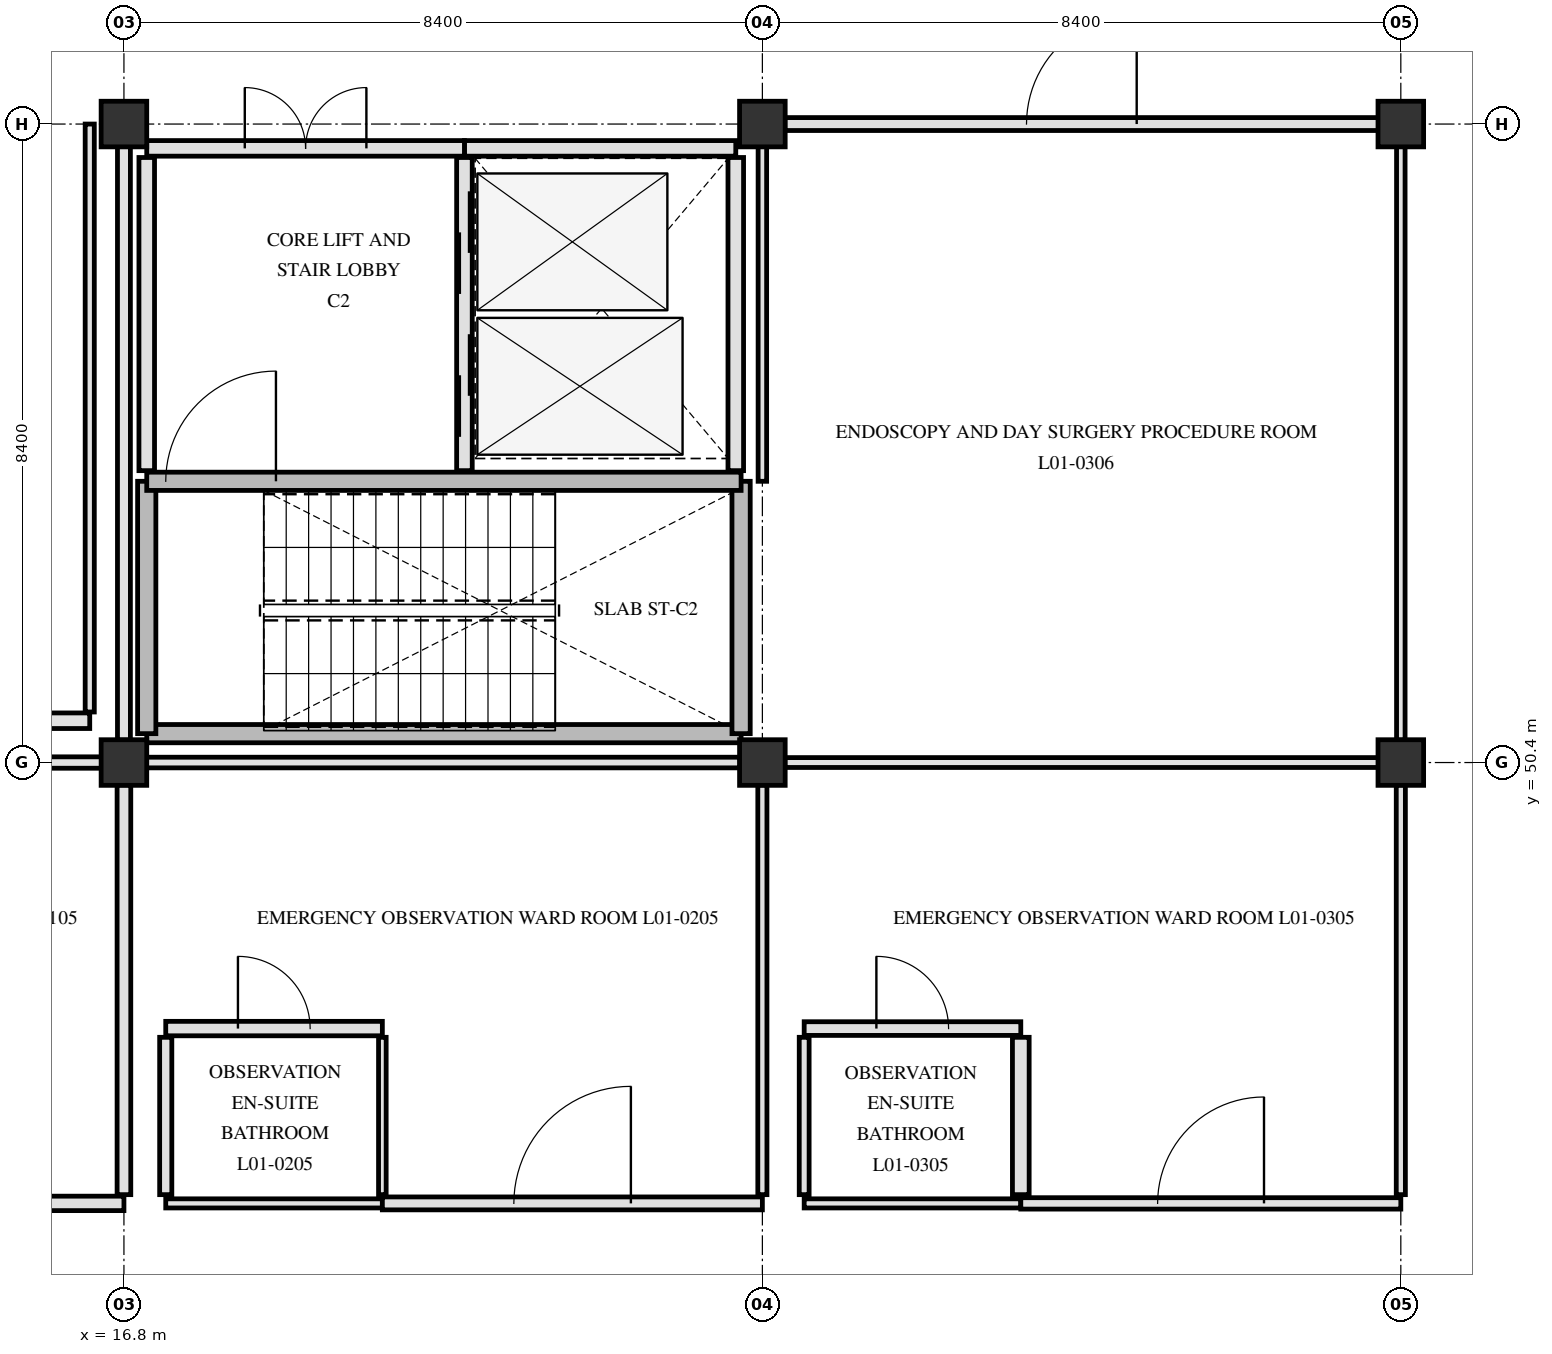
"""IFC4 building model, lengths in metres.
Left out: names, types, materials, properties, quantities, classifications, styles, units other than length and angle.
Written with IfcOpenShell. Run it as: python <this file> out.ifc"""

import sys

from ifc_helpers import new_model, si_unit, direction, frame, frame_2d, origin, origin_2d, place, context, subcontext, project, spatial, rectangle, extrude, element, fill, save


model = new_model("IFC4")
c1 = context("Model", 3, precision=1e-05, world=origin(), true_north=direction((0.0, 1.0)))
c2 = subcontext(c1, "Body", "Model", "MODEL_VIEW")
j1 = project(units=[si_unit("LENGTHUNIT", "METRE"), si_unit("PLANEANGLEUNIT", "RADIAN")], contexts=[c1])
p1 = place(None, origin())
s1 = spatial("IfcSite", under=j1, at=p1, CompositionType="ELEMENT")
p2 = place(p1, origin())
s2 = spatial("IfcBuilding", under=s1, at=p2, CompositionType="ELEMENT")
p3 = place(p2, frame((0.0, 0.0, 4.8)))
s3 = spatial("IfcBuildingStorey", under=s2, at=p3, CompositionType="ELEMENT", Elevation=4.8)
for number, where, z_axis, x_axis in (
    (1, (16.8, 50.4, 0.0), (0.0, 0.0, 1.0), (1.0, 0.0, 0.0)),
    (2, (16.8, 58.8, 0.0), (0.0, 0.0, 1.0), (1.0, 0.0, 0.0)),
    (3, (25.2, 50.4, 0.0), (0.0, 0.0, 1.0), (1.0, 0.0, 0.0)),
    (4, (25.2, 58.8, 0.0), (0.0, 0.0, 1.0), (1.0, 0.0, 0.0)),
    (5, (33.6, 50.4, 0.0), (0.0, 0.0, 1.0), (1.0, 0.0, 0.0)),
    (6, (33.6, 58.8, 0.0), (0.0, 0.0, 1.0), (1.0, 0.0, 0.0)),
):
    element("IfcColumn", number, at=place(p3, frame(where, z_axis=z_axis, x_axis=x_axis)), inside=s3, PredefinedType="COLUMN", context=c2, shape_type="SweptSolid", body=[
        extrude(rectangle(XDim=0.6, YDim=0.6, at=origin_2d()), origin(), (0.0, 0.0, 1.0), 4.5),
    ])
p4 = place(p3, frame((17.1, 50.78, 0.0), z_axis=(0.0, 0.0, 1.0), x_axis=(1.0, 0.0, 0.0)))
e7 = element("IfcWall", 7, at=p4, inside=s3, PredefinedType="SHEAR", context=c2, shape_type="SweptSolid", body=[
    extrude(rectangle(XDim=7.82, YDim=0.24, at=frame_2d((3.91, 0.0))), origin(), (0.0, 0.0, 1.0), 4.15),
])
for number, where, z_axis, x_axis in (
    (8, (17.1, 50.78, 0.0), (0.0, 0.0, 1.0), (0.0, 1.0, 0.0)),
    (9, (24.92, 50.78, 0.0), (0.0, 0.0, 1.0), (0.0, 1.0, 0.0)),
):
    element("IfcWall", number, at=place(p3, frame(where, z_axis=z_axis, x_axis=x_axis)), inside=s3, PredefinedType="SHEAR", context=c2, shape_type="SweptSolid", body=[
        extrude(rectangle(XDim=3.32, YDim=0.24, at=frame_2d((1.66, 0.0))), origin(), (0.0, 0.0, 1.0), 4.15),
    ])
p5 = place(p3, frame((17.1, 54.1, 0.0), z_axis=(0.0, 0.0, 1.0), x_axis=(1.0, 0.0, 0.0)))
e10 = element("IfcWall", 10, at=p5, inside=s3, PredefinedType="SHEAR", context=c2, shape_type="SweptSolid", body=[
    extrude(rectangle(XDim=7.82, YDim=0.24, at=frame_2d((3.91, 0.0))), origin(), (0.0, 0.0, 1.0), 4.15),
])
p6 = place(p5, frame((0.25, 0.0, 0.0)))
e11 = element("IfcOpeningElement", 11, at=p6, cuts=e10, PredefinedType="OPENING", context=c2, shape_type="SweptSolid", body=[
    extrude(rectangle(XDim=1.45, YDim=2.2, at=frame_2d((0.725, 1.1))), frame((0.0, 0.13, 0.0), z_axis=(0.0, -1.0, 0.0), x_axis=(1.0, 0.0, 0.0)), (0.0, 0.0, 1.0), 0.26),
])
p7 = place(p3, frame((21.28, 54.24, 0.0), z_axis=(0.0, 0.0, 1.0), x_axis=(0.0, 1.0, 0.0)))
e12 = element("IfcWall", 12, at=p7, inside=s3, PredefinedType="PARTITIONING", context=c2, shape_type="SweptSolid", body=[
    extrude(rectangle(XDim=4.12, YDim=0.205, at=frame_2d((2.06, 0.0))), origin(), (0.0, 0.0, 1.0), 4.14),
])
p8 = place(p7, frame((0.445, 0.0, 0.0)))
e13 = element("IfcOpeningElement", 13, at=p8, cuts=e12, PredefinedType="OPENING", context=c2, shape_type="SweptSolid", body=[
    extrude(rectangle(XDim=1.35, YDim=2.2, at=frame_2d((0.675, 1.1))), frame((0.0, 0.113, 0.0), z_axis=(0.0, -1.0, 0.0), x_axis=(1.0, 0.0, 0.0)), (0.0, 0.0, 1.0), 0.225),
])
p9 = place(p7, frame((2.325, 0.0, 0.0)))
e14 = element("IfcOpeningElement", 14, at=p9, cuts=e12, PredefinedType="OPENING", context=c2, shape_type="SweptSolid", body=[
    extrude(rectangle(XDim=1.35, YDim=2.2, at=frame_2d((0.675, 1.1))), frame((0.0, 0.113, 0.0), z_axis=(0.0, -1.0, 0.0), x_axis=(1.0, 0.0, 0.0)), (0.0, 0.0, 1.0), 0.225),
])
p10 = place(p3, frame((24.85, 54.24, 0.0), z_axis=(0.0, 0.0, 1.0), x_axis=(0.0, 1.0, 0.0)))
e15 = element("IfcWall", 15, at=p10, inside=s3, PredefinedType="PARTITIONING", context=c2, shape_type="SweptSolid", body=[
    extrude(rectangle(XDim=4.12, YDim=0.205, at=frame_2d((2.06, 0.0))), origin(), (0.0, 0.0, 1.0), 4.14),
])
p11 = place(p3, frame((21.28, 58.48, 0.0), z_axis=(0.0, 0.0, 1.0), x_axis=(1.0, 0.0, 0.0)))
e16 = element("IfcWall", 16, at=p11, inside=s3, PredefinedType="PARTITIONING", context=c2, shape_type="SweptSolid", body=[
    extrude(rectangle(XDim=3.57, YDim=0.205, at=frame_2d((1.785, 0.0))), origin(), (0.0, 0.0, 1.0), 3.54),
])
p12 = place(p3, frame((17.1, 54.24, 0.0), z_axis=(0.0, 0.0, 1.0), x_axis=(0.0, 1.0, 0.0)))
e17 = element("IfcWall", 17, at=p12, inside=s3, PredefinedType="PARTITIONING", context=c2, shape_type="SweptSolid", body=[
    extrude(rectangle(XDim=4.12, YDim=0.205, at=frame_2d((2.06, 0.0))), origin(), (0.0, 0.0, 1.0), 3.59),
])
p13 = place(p3, frame((17.1, 58.48, 0.0), z_axis=(0.0, 0.0, 1.0), x_axis=(1.0, 0.0, 0.0)))
e18 = element("IfcWall", 18, at=p13, inside=s3, PredefinedType="PARTITIONING", context=c2, shape_type="SweptSolid", body=[
    extrude(rectangle(XDim=4.18, YDim=0.205, at=frame_2d((2.09, 0.0))), origin(), (0.0, 0.0, 1.0), 3.54),
])
p14 = place(p13, frame((1.29, 0.0, 0.0)))
e19 = element("IfcOpeningElement", 19, at=p14, cuts=e18, PredefinedType="OPENING", context=c2, shape_type="SweptSolid", body=[
    extrude(rectangle(XDim=1.6, YDim=2.25, at=frame_2d((0.8, 1.125))), frame((0.0, 0.113, 0.0), z_axis=(0.0, -1.0, 0.0), x_axis=(1.0, 0.0, 0.0)), (0.0, 0.0, 1.0), 0.225),
])
p15 = place(p3, frame((11.8, 44.6, 0.0), z_axis=(0.0, 0.0, 1.0), x_axis=(1.0, 0.0, 0.0)))
e20 = element("IfcWall", 20, at=p15, inside=s3, PredefinedType="PARTITIONING", context=c2, shape_type="SweptSolid", body=[
    extrude(rectangle(XDim=5.0, YDim=0.19, at=frame_2d((2.5, 0.0))), origin(), (0.0, 0.0, 1.0), 3.59),
])
p16 = place(p15, frame((1.91, 0.0, 0.0)))
e21 = element("IfcOpeningElement", 21, at=p16, cuts=e20, PredefinedType="OPENING", context=c2, shape_type="SweptSolid", body=[
    extrude(rectangle(XDim=1.18, YDim=2.18, at=frame_2d((0.59, 1.09))), frame((0.0, 0.105, 0.0), z_axis=(0.0, -1.0, 0.0), x_axis=(1.0, 0.0, 0.0)), (0.0, 0.0, 1.0), 0.21),
])
p17 = place(p3, frame((17.35, 44.6, 0.0), z_axis=(0.0, 0.0, 1.0), x_axis=(1.0, 0.0, 0.0)))
e22 = element("IfcWall", 22, at=p17, inside=s3, PredefinedType="PARTITIONING", context=c2, shape_type="SweptSolid", body=[
    extrude(rectangle(XDim=2.85, YDim=0.12, at=frame_2d((1.425, 0.0))), origin(), (0.0, 0.0, 1.0), 4.14),
])
p18 = place(p3, frame((20.2, 44.6, 0.0), z_axis=(0.0, 0.0, 1.0), x_axis=(1.0, 0.0, 0.0)))
e23 = element("IfcWall", 23, at=p18, inside=s3, PredefinedType="PARTITIONING", context=c2, shape_type="SweptSolid", body=[
    extrude(rectangle(XDim=5.0, YDim=0.17, at=frame_2d((2.5, 0.0))), origin(), (0.0, 0.0, 1.0), 3.59),
])
p19 = place(p18, frame((1.73, 0.0, 0.0)))
e24 = element("IfcOpeningElement", 24, at=p19, cuts=e23, PredefinedType="OPENING", context=c2, shape_type="SweptSolid", body=[
    extrude(rectangle(XDim=1.54, YDim=2.24, at=frame_2d((0.77, 1.12))), frame((0.0, 0.095, 0.0), z_axis=(0.0, -1.0, 0.0), x_axis=(1.0, 0.0, 0.0)), (0.0, 0.0, 1.0), 0.19),
])
p20 = place(p3, frame((25.75, 44.6, 0.0), z_axis=(0.0, 0.0, 1.0), x_axis=(1.0, 0.0, 0.0)))
e25 = element("IfcWall", 25, at=p20, inside=s3, PredefinedType="PARTITIONING", context=c2, shape_type="SweptSolid", body=[
    extrude(rectangle(XDim=2.85, YDim=0.12, at=frame_2d((1.425, 0.0))), origin(), (0.0, 0.0, 1.0), 4.14),
])
p21 = place(p3, frame((28.6, 44.6, 0.0), z_axis=(0.0, 0.0, 1.0), x_axis=(1.0, 0.0, 0.0)))
e26 = element("IfcWall", 26, at=p21, inside=s3, PredefinedType="PARTITIONING", context=c2, shape_type="SweptSolid", body=[
    extrude(rectangle(XDim=5.0, YDim=0.15, at=frame_2d((2.5, 0.0))), origin(), (0.0, 0.0, 1.0), 3.59),
])
p22 = place(p21, frame((1.8, 0.0, 0.0)))
e27 = element("IfcOpeningElement", 27, at=p22, cuts=e26, PredefinedType="OPENING", context=c2, shape_type="SweptSolid", body=[
    extrude(rectangle(XDim=1.4, YDim=2.2, at=frame_2d((0.7, 1.1))), frame((0.0, 0.085, 0.0), z_axis=(0.0, -1.0, 0.0), x_axis=(1.0, 0.0, 0.0)), (0.0, 0.0, 1.0), 0.17),
])
p23 = place(p3, frame((17.35, 46.9, 0.0), z_axis=(0.0, 0.0, 1.0), x_axis=(1.0, 0.0, 0.0)))
e28 = element("IfcWall", 28, at=p23, inside=s3, PredefinedType="PARTITIONING", context=c2, shape_type="SweptSolid", body=[
    extrude(rectangle(XDim=2.85, YDim=0.19, at=frame_2d((1.425, 0.0))), origin(), (0.0, 0.0, 1.0), 4.14),
])
p24 = place(p23, frame((0.95, 0.0, 0.0)))
e29 = element("IfcOpeningElement", 29, at=p24, cuts=e28, PredefinedType="OPENING", context=c2, shape_type="SweptSolid", body=[
    extrude(rectangle(XDim=0.95, YDim=2.1, at=frame_2d((0.475, 1.05))), frame((0.0, 0.105, 0.0), z_axis=(0.0, -1.0, 0.0), x_axis=(1.0, 0.0, 0.0)), (0.0, 0.0, 1.0), 0.21),
])
p25 = place(p3, frame((25.75, 46.9, 0.0), z_axis=(0.0, 0.0, 1.0), x_axis=(1.0, 0.0, 0.0)))
e30 = element("IfcWall", 30, at=p25, inside=s3, PredefinedType="PARTITIONING", context=c2, shape_type="SweptSolid", body=[
    extrude(rectangle(XDim=2.85, YDim=0.18, at=frame_2d((1.425, 0.0))), origin(), (0.0, 0.0, 1.0), 4.14),
])
p26 = place(p25, frame((0.95, 0.0, 0.0)))
e31 = element("IfcOpeningElement", 31, at=p26, cuts=e30, PredefinedType="OPENING", context=c2, shape_type="SweptSolid", body=[
    extrude(rectangle(XDim=0.95, YDim=2.1, at=frame_2d((0.475, 1.05))), frame((0.0, 0.1, 0.0), z_axis=(0.0, -1.0, 0.0), x_axis=(1.0, 0.0, 0.0)), (0.0, 0.0, 1.0), 0.2),
])
p27 = place(p3, frame((8.695, 50.4, 0.0), z_axis=(0.0, 0.0, 1.0), x_axis=(1.0, 0.0, 0.0)))
e32 = element("IfcWall", 32, at=p27, inside=s3, PredefinedType="PARTITIONING", context=c2, shape_type="SweptSolid", body=[
    extrude(rectangle(XDim=7.81, YDim=0.15, at=frame_2d((3.905, 0.0))), origin(), (0.0, 0.0, 1.0), 3.54),
])
p28 = place(p3, frame((17.095, 50.4, 0.0), z_axis=(0.0, 0.0, 1.0), x_axis=(1.0, 0.0, 0.0)))
e33 = element("IfcWall", 33, at=p28, inside=s3, PredefinedType="PARTITIONING", context=c2, shape_type="SweptSolid", body=[
    extrude(rectangle(XDim=7.81, YDim=0.14, at=frame_2d((3.905, 0.0))), origin(), (0.0, 0.0, 1.0), 3.54),
])
p29 = place(p3, frame((25.495, 50.4, 0.0), z_axis=(0.0, 0.0, 1.0), x_axis=(1.0, 0.0, 0.0)))
e34 = element("IfcWall", 34, at=p29, inside=s3, PredefinedType="PARTITIONING", context=c2, shape_type="SweptSolid", body=[
    extrude(rectangle(XDim=7.81, YDim=0.13, at=frame_2d((3.905, 0.0))), origin(), (0.0, 0.0, 1.0), 3.54),
])
p30 = place(p3, frame((14.35, 50.95, 0.0), z_axis=(0.0, 0.0, 1.0), x_axis=(1.0, 0.0, 0.0)))
e35 = element("IfcWall", 35, at=p30, inside=s3, PredefinedType="PARTITIONING", context=c2, shape_type="SweptSolid", body=[
    extrude(rectangle(XDim=2.0, YDim=0.205, at=frame_2d((1.0, 0.0))), origin(), (0.0, 0.0, 1.0), 4.14),
])
p31 = place(p3, frame((25.495, 58.8, 0.0), z_axis=(0.0, 0.0, 1.0), x_axis=(1.0, 0.0, 0.0)))
e36 = element("IfcWall", 36, at=p31, inside=s3, PredefinedType="PARTITIONING", context=c2, shape_type="SweptSolid", body=[
    extrude(rectangle(XDim=7.81, YDim=0.17, at=frame_2d((3.905, 0.0))), origin(), (0.0, 0.0, 1.0), 3.54),
])
p32 = place(p31, frame((3.18, 0.0, 0.0)))
e37 = element("IfcOpeningElement", 37, at=p32, cuts=e36, PredefinedType="OPENING", context=c2, shape_type="SweptSolid", body=[
    extrude(rectangle(XDim=1.45, YDim=2.2, at=frame_2d((0.725, 1.1))), frame((0.0, 0.095, 0.0), z_axis=(0.0, -1.0, 0.0), x_axis=(1.0, 0.0, 0.0)), (0.0, 0.0, 1.0), 0.19),
])
p33 = place(p3, frame((16.35, 51.065, 0.0), z_axis=(0.0, 0.0, 1.0), x_axis=(0.0, 1.0, 0.0)))
e38 = element("IfcWall", 38, at=p33, inside=s3, PredefinedType="PARTITIONING", context=c2, shape_type="SweptSolid", body=[
    extrude(rectangle(XDim=7.735, YDim=0.12, at=frame_2d((3.868, 0.0))), origin(), (0.0, 0.0, 1.0), 3.54),
])
p34 = place(p3, frame((16.8, 44.715, 0.0), z_axis=(0.0, 0.0, 1.0), x_axis=(0.0, 1.0, 0.0)))
e39 = element("IfcWall", 39, at=p34, inside=s3, PredefinedType="PARTITIONING", context=c2, shape_type="SweptSolid", body=[
    extrude(rectangle(XDim=5.39, YDim=0.18, at=frame_2d((2.695, 0.0))), origin(), (0.0, 0.0, 1.0), 3.59),
])
p35 = place(p3, frame((16.8, 50.695, 0.0), z_axis=(0.0, 0.0, 1.0), x_axis=(0.0, 1.0, 0.0)))
e40 = element("IfcWall", 40, at=p35, inside=s3, PredefinedType="PARTITIONING", context=c2, shape_type="SweptSolid", body=[
    extrude(rectangle(XDim=7.81, YDim=0.17, at=frame_2d((3.905, 0.0))), origin(), (0.0, 0.0, 1.0), 3.59),
])
p36 = place(p3, frame((17.35, 44.715, 0.0), z_axis=(0.0, 0.0, 1.0), x_axis=(0.0, 1.0, 0.0)))
e41 = element("IfcWall", 41, at=p36, inside=s3, PredefinedType="PARTITIONING", context=c2, shape_type="SweptSolid", body=[
    extrude(rectangle(XDim=2.07, YDim=0.16, at=frame_2d((1.035, 0.0))), origin(), (0.0, 0.0, 1.0), 4.14),
])
p37 = place(p3, frame((20.2, 44.715, 0.0), z_axis=(0.0, 0.0, 1.0), x_axis=(0.0, 1.0, 0.0)))
e42 = element("IfcWall", 42, at=p37, inside=s3, PredefinedType="PARTITIONING", context=c2, shape_type="SweptSolid", body=[
    extrude(rectangle(XDim=2.07, YDim=0.1, at=frame_2d((1.035, 0.0))), origin(), (0.0, 0.0, 1.0), 4.14),
])
p38 = place(p3, frame((25.2, 44.715, 0.0), z_axis=(0.0, 0.0, 1.0), x_axis=(0.0, 1.0, 0.0)))
e43 = element("IfcWall", 43, at=p38, inside=s3, PredefinedType="PARTITIONING", context=c2, shape_type="SweptSolid", body=[
    extrude(rectangle(XDim=5.39, YDim=0.12, at=frame_2d((2.695, 0.0))), origin(), (0.0, 0.0, 1.0), 3.59),
])
p39 = place(p3, frame((25.2, 54.1, 0.0), z_axis=(0.0, 0.0, 1.0), x_axis=(0.0, 1.0, 0.0)))
e44 = element("IfcWall", 44, at=p39, inside=s3, PredefinedType="PARTITIONING", context=c2, shape_type="SweptSolid", body=[
    extrude(rectangle(XDim=4.405, YDim=0.112, at=frame_2d((2.202, 0.0))), origin(), (0.0, 0.0, 1.0), 3.59),
])
p40 = place(p3, frame((25.75, 44.715, 0.0), z_axis=(0.0, 0.0, 1.0), x_axis=(0.0, 1.0, 0.0)))
e45 = element("IfcWall", 45, at=p40, inside=s3, PredefinedType="PARTITIONING", context=c2, shape_type="SweptSolid", body=[
    extrude(rectangle(XDim=2.07, YDim=0.13, at=frame_2d((1.035, 0.0))), origin(), (0.0, 0.0, 1.0), 4.14),
])
p41 = place(p3, frame((28.6, 44.715, 0.0), z_axis=(0.0, 0.0, 1.0), x_axis=(0.0, 1.0, 0.0)))
e46 = element("IfcWall", 46, at=p41, inside=s3, PredefinedType="PARTITIONING", context=c2, shape_type="SweptSolid", body=[
    extrude(rectangle(XDim=2.07, YDim=0.22, at=frame_2d((1.035, 0.0))), origin(), (0.0, 0.0, 1.0), 4.14),
])
p42 = place(p3, frame((33.6, 44.715, 0.0), z_axis=(0.0, 0.0, 1.0), x_axis=(0.0, 1.0, 0.0)))
e47 = element("IfcWall", 47, at=p42, inside=s3, PredefinedType="PARTITIONING", context=c2, shape_type="SweptSolid", body=[
    extrude(rectangle(XDim=5.39, YDim=0.12, at=frame_2d((2.695, 0.0))), origin(), (0.0, 0.0, 1.0), 3.59),
])
p43 = place(p3, frame((33.6, 50.695, 0.0), z_axis=(0.0, 0.0, 1.0), x_axis=(0.0, 1.0, 0.0)))
e48 = element("IfcWall", 48, at=p43, inside=s3, PredefinedType="PARTITIONING", context=c2, shape_type="SweptSolid", body=[
    extrude(rectangle(XDim=7.81, YDim=0.112, at=frame_2d((3.905, 0.0))), origin(), (0.0, 0.0, 1.0), 3.59),
])
p44 = place(p6, origin())
e49 = element("IfcDoor", 49, at=p44, inside=s3, OperationType="SINGLE_SWING_RIGHT", PredefinedType="DOOR", context=c2, shape_type="SweptSolid", body=[
    extrude(rectangle(XDim=1.45, YDim=2.2, at=frame_2d((0.725, 1.1))), frame((0.0, 0.025, 0.0), z_axis=(0.0, -1.0, 0.0), x_axis=(1.0, 0.0, 0.0)), (0.0, 0.0, 1.0), 0.05),
])
fill(e11, e49)
p45 = place(p8, origin())
e50 = element("IfcDoor", 50, at=p45, inside=s3, OperationType="SLIDING_TO_LEFT", PredefinedType="DOOR", context=c2, shape_type="SweptSolid", body=[
    extrude(rectangle(XDim=1.35, YDim=2.2, at=frame_2d((0.675, 1.1))), frame((0.0, 0.025, 0.0), z_axis=(0.0, -1.0, 0.0), x_axis=(1.0, 0.0, 0.0)), (0.0, 0.0, 1.0), 0.05),
])
fill(e13, e50)
p46 = place(p9, origin())
e51 = element("IfcDoor", 51, at=p46, inside=s3, OperationType="SLIDING_TO_LEFT", PredefinedType="DOOR", context=c2, shape_type="SweptSolid", body=[
    extrude(rectangle(XDim=1.35, YDim=2.2, at=frame_2d((0.675, 1.1))), frame((0.0, 0.025, 0.0), z_axis=(0.0, -1.0, 0.0), x_axis=(1.0, 0.0, 0.0)), (0.0, 0.0, 1.0), 0.05),
])
fill(e14, e51)
p47 = place(p14, origin())
e52 = element("IfcDoor", 52, at=p47, inside=s3, OperationType="DOUBLE_SWING_LEFT", PredefinedType="DOOR", context=c2, shape_type="SweptSolid", body=[
    extrude(rectangle(XDim=1.6, YDim=2.25, at=frame_2d((0.8, 1.125))), frame((0.0, 0.025, 0.0), z_axis=(0.0, -1.0, 0.0), x_axis=(1.0, 0.0, 0.0)), (0.0, 0.0, 1.0), 0.05),
])
fill(e19, e52)
p48 = place(p19, origin())
e53 = element("IfcDoor", 53, at=p48, inside=s3, OperationType="SINGLE_SWING_RIGHT", PredefinedType="DOOR", context=c2, shape_type="SweptSolid", body=[
    extrude(rectangle(XDim=1.54, YDim=2.24, at=frame_2d((0.77, 1.12))), frame((0.0, 0.025, 0.0), z_axis=(0.0, -1.0, 0.0), x_axis=(1.0, 0.0, 0.0)), (0.0, 0.0, 1.0), 0.05),
])
fill(e24, e53)
p49 = place(p24, origin())
e54 = element("IfcDoor", 54, at=p49, inside=s3, OperationType="SINGLE_SWING_LEFT", PredefinedType="DOOR", context=c2, shape_type="SweptSolid", body=[
    extrude(rectangle(XDim=0.95, YDim=2.1, at=frame_2d((0.475, 1.05))), frame((0.0, 0.025, 0.0), z_axis=(0.0, -1.0, 0.0), x_axis=(1.0, 0.0, 0.0)), (0.0, 0.0, 1.0), 0.05),
])
fill(e29, e54)
p50 = place(p22, origin())
e55 = element("IfcDoor", 55, at=p50, inside=s3, OperationType="SINGLE_SWING_RIGHT", PredefinedType="DOOR", context=c2, shape_type="SweptSolid", body=[
    extrude(rectangle(XDim=1.4, YDim=2.2, at=frame_2d((0.7, 1.1))), frame((0.0, 0.025, 0.0), z_axis=(0.0, -1.0, 0.0), x_axis=(1.0, 0.0, 0.0)), (0.0, 0.0, 1.0), 0.05),
])
fill(e27, e55)
p51 = place(p26, origin())
e56 = element("IfcDoor", 56, at=p51, inside=s3, OperationType="SINGLE_SWING_LEFT", PredefinedType="DOOR", context=c2, shape_type="SweptSolid", body=[
    extrude(rectangle(XDim=0.95, YDim=2.1, at=frame_2d((0.475, 1.05))), frame((0.0, 0.025, 0.0), z_axis=(0.0, -1.0, 0.0), x_axis=(1.0, 0.0, 0.0)), (0.0, 0.0, 1.0), 0.05),
])
fill(e31, e56)
p52 = place(p32, origin())
e57 = element("IfcDoor", 57, at=p52, inside=s3, OperationType="SINGLE_SWING_RIGHT", PredefinedType="DOOR", context=c2, shape_type="SweptSolid", body=[
    extrude(rectangle(XDim=1.45, YDim=2.2, at=frame_2d((0.725, 1.1))), frame((0.0, 0.025, 0.0), z_axis=(0.0, -1.0, 0.0), x_axis=(1.0, 0.0, 0.0)), (0.0, 0.0, 1.0), 0.05),
])
fill(e37, e57)
save(model, sys.argv[1])
